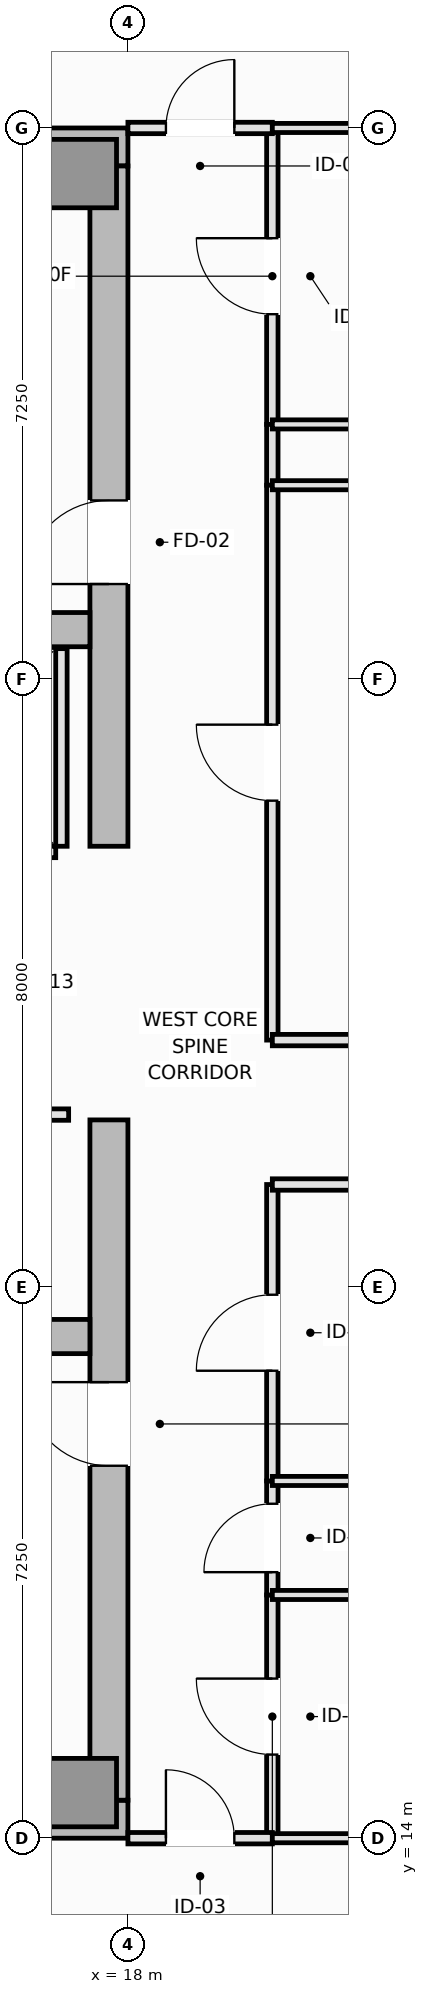
"""IFC4 building model, lengths in metres.
Left out: names, types, materials, properties, quantities, classifications, styles, units other than length and angle.
Written with IfcOpenShell. Run it as: python <this file> out.ifc"""

import sys

from ifc_helpers import new_model, si_unit, direction, frame, frame_2d, origin, origin_2d, place, context, subcontext, project, spatial, rectangle, extrude, element, fill, save


model = new_model("IFC4")
c1 = context("Model", 3, precision=1e-05, world=origin(), true_north=direction((0.0, 1.0)))
c2 = subcontext(c1, "Body", "Model", "MODEL_VIEW")
j1 = project(units=[si_unit("LENGTHUNIT", "METRE"), si_unit("PLANEANGLEUNIT", "RADIAN")], contexts=[c1])
p1 = place(None, origin())
s1 = spatial("IfcSite", under=j1, at=p1, CompositionType="ELEMENT")
p2 = place(p1, origin())
s2 = spatial("IfcBuilding", under=s1, at=p2, CompositionType="ELEMENT")
p3 = place(p2, frame((0.0, 0.0, 249.25)))
s3 = spatial("IfcBuildingStorey", under=s2, at=p3, CompositionType="ELEMENT", Elevation=249.25)
for number, where, z_axis, x_axis in (
    (1, (4.5, 14.25, 0.0), (0.0, 0.0, 1.0), (1.0, 0.0, 0.0)),
    (2, (4.5, 36.25, 0.0), (0.0, 0.0, 1.0), (1.0, 0.0, 0.0)),
):
    element("IfcWall", number, at=place(p3, frame(where, z_axis=z_axis, x_axis=x_axis)), inside=s3, PredefinedType="SHEAR", context=c2, shape_type="SweptSolid", body=[
        extrude(rectangle(XDim=13.5, YDim=0.5, at=frame_2d((6.75, 0.0))), origin(), (0.0, 0.0, 1.0), 3.55),
    ])
p4 = place(p3, frame((17.75, 14.5, 0.0), z_axis=(0.0, 0.0, 1.0), x_axis=(0.0, 1.0, 0.0)))
e3 = element("IfcWall", 3, at=p4, inside=s3, PredefinedType="SHEAR", context=c2, shape_type="SweptSolid", body=[
    extrude(rectangle(XDim=8.95, YDim=0.5, at=frame_2d((4.475, 0.0))), origin(), (0.0, 0.0, 1.0), 3.55),
])
p5 = place(p4, frame((4.4, 0.0, 0.0)))
e4 = element("IfcOpeningElement", 4, at=p5, cuts=e3, PredefinedType="OPENING", context=c2, shape_type="SweptSolid", body=[
    extrude(rectangle(XDim=1.1, YDim=2.15, at=frame_2d((0.55, 1.075))), frame((0.0, 0.26, 0.0), z_axis=(0.0, -1.0, 0.0), x_axis=(1.0, 0.0, 0.0)), (0.0, 0.0, 1.0), 0.52),
])
p6 = place(p3, frame((17.75, 27.05, 0.0), z_axis=(0.0, 0.0, 1.0), x_axis=(0.0, 1.0, 0.0)))
e5 = element("IfcWall", 5, at=p6, inside=s3, PredefinedType="SHEAR", context=c2, shape_type="SweptSolid", body=[
    extrude(rectangle(XDim=8.95, YDim=0.5, at=frame_2d((4.475, 0.0))), origin(), (0.0, 0.0, 1.0), 3.55),
])
p7 = place(p6, frame((3.45, 0.0, 0.0)))
e6 = element("IfcOpeningElement", 6, at=p7, cuts=e5, PredefinedType="OPENING", context=c2, shape_type="SweptSolid", body=[
    extrude(rectangle(XDim=1.1, YDim=2.15, at=frame_2d((0.55, 1.075))), frame((0.0, 0.26, 0.0), z_axis=(0.0, -1.0, 0.0), x_axis=(1.0, 0.0, 0.0)), (0.0, 0.0, 1.0), 0.52),
])
for number, where, z_axis, x_axis in (
    (7, (5.0, 20.6, 0.0), (0.0, 0.0, 1.0), (1.0, 0.0, 0.0)),
    (8, (5.0, 29.9, 0.0), (0.0, 0.0, 1.0), (1.0, 0.0, 0.0)),
):
    element("IfcWall", number, at=place(p3, frame(where, z_axis=z_axis, x_axis=x_axis)), inside=s3, PredefinedType="SHEAR", context=c2, shape_type="SweptSolid", body=[
        extrude(rectangle(XDim=12.5, YDim=0.45, at=frame_2d((6.25, 0.0))), origin(), (0.0, 0.0, 1.0), 3.55),
    ])
for number, where, z_axis, x_axis in (
    (9, (17.4, 14.6, 0.0), (0.0, 0.0, 1.0), (1.0, 0.0, 0.0)),
    (10, (17.4, 35.9, 0.0), (0.0, 0.0, 1.0), (1.0, 0.0, 0.0)),
):
    element("IfcColumn", number, at=place(p3, frame(where, z_axis=z_axis, x_axis=x_axis)), inside=s3, PredefinedType="PILASTER", context=c2, shape_type="SweptSolid", body=[
        extrude(rectangle(XDim=0.9, YDim=0.9, at=origin_2d()), origin(), (0.0, 0.0, 1.0), 3.55),
    ])
p8 = place(p3, frame((14.5, 26.975, 0.0), z_axis=(0.0, 0.0, 1.0), x_axis=(1.0, 0.0, 0.0)))
e11 = element("IfcWall", 11, at=p8, inside=s3, PredefinedType="PARTITIONING", context=c2, shape_type="SweptSolid", body=[
    extrude(rectangle(XDim=2.55, YDim=0.15, at=frame_2d((1.275, 0.0))), origin(), (0.0, 0.0, 1.0), 3.39),
])
p9 = place(p8, frame((0.625, 0.0, 0.0)))
e12 = element("IfcOpeningElement", 12, at=p9, cuts=e11, PredefinedType="OPENING", context=c2, shape_type="SweptSolid", body=[
    extrude(rectangle(XDim=1.3, YDim=2.2, at=frame_2d((0.65, 1.1))), frame((0.0, 0.085, 0.0), z_axis=(0.0, -1.0, 0.0), x_axis=(1.0, 0.0, 0.0)), (0.0, 0.0, 1.0), 0.17),
])
p10 = place(p3, frame((17.125, 27.05, 0.0), z_axis=(0.0, 0.0, 1.0), x_axis=(0.0, 1.0, 0.0)))
e13 = element("IfcWall", 13, at=p10, inside=s3, PredefinedType="PARTITIONING", context=c2, shape_type="SweptSolid", body=[
    extrude(rectangle(XDim=2.6, YDim=0.15, at=frame_2d((1.3, 0.0))), origin(), (0.0, 0.0, 1.0), 3.39),
])
p11 = place(p3, frame((14.33, 23.52, 0.0), z_axis=(0.0, 0.0, 1.0), x_axis=(1.0, 0.0, 0.0)))
e14 = element("IfcWall", 14, at=p11, inside=s3, PredefinedType="PARTITIONING", context=c2, shape_type="SweptSolid", body=[
    extrude(rectangle(XDim=2.89, YDim=0.15, at=frame_2d((1.445, 0.0))), origin(), (0.0, 0.0, 1.0), 3.39),
])
p12 = place(p11, frame((0.28, 0.0, 0.0)))
e15 = element("IfcOpeningElement", 15, at=p12, cuts=e14, PredefinedType="OPENING", context=c2, shape_type="SweptSolid", body=[
    extrude(rectangle(XDim=0.9, YDim=2.1, at=frame_2d((0.45, 1.05))), frame((0.0, 0.085, 0.0), z_axis=(0.0, -1.0, 0.0), x_axis=(1.0, 0.0, 0.0)), (0.0, 0.0, 1.0), 0.17),
])
p13 = place(p11, frame((1.71, 0.0, 0.0)))
e16 = element("IfcOpeningElement", 16, at=p13, cuts=e14, PredefinedType="OPENING", context=c2, shape_type="SweptSolid", body=[
    extrude(rectangle(XDim=0.9, YDim=2.1, at=frame_2d((0.45, 1.05))), frame((0.0, 0.085, 0.0), z_axis=(0.0, -1.0, 0.0), x_axis=(1.0, 0.0, 0.0)), (0.0, 0.0, 1.0), 0.17),
])
p14 = place(p3, frame((19.9, 14.0, 0.0), z_axis=(0.0, 0.0, 1.0), x_axis=(0.0, 1.0, 0.0)))
e17 = element("IfcWall", 17, at=p14, inside=s3, PredefinedType="PARTITIONING", context=c2, shape_type="SweptSolid", body=[
    extrude(rectangle(XDim=3.2, YDim=0.15, at=frame_2d((1.6, 0.0))), origin(), (0.0, 0.0, 1.0), 3.39),
])
p15 = place(p14, frame((1.1, 0.0, 0.0)))
e18 = element("IfcOpeningElement", 18, at=p15, cuts=e17, PredefinedType="OPENING", context=c2, shape_type="SweptSolid", body=[
    extrude(rectangle(XDim=1.0, YDim=2.15, at=frame_2d((0.5, 1.075))), frame((0.0, 0.085, 0.0), z_axis=(0.0, -1.0, 0.0), x_axis=(1.0, 0.0, 0.0)), (0.0, 0.0, 1.0), 0.17),
])
p16 = place(p3, frame((19.9, 17.2, 0.0), z_axis=(0.0, 0.0, 1.0), x_axis=(0.0, 1.0, 0.0)))
e19 = element("IfcWall", 19, at=p16, inside=s3, PredefinedType="PARTITIONING", context=c2, shape_type="SweptSolid", body=[
    extrude(rectangle(XDim=1.5, YDim=0.15, at=frame_2d((0.75, 0.0))), origin(), (0.0, 0.0, 1.0), 3.39),
])
p17 = place(p16, frame((0.3, 0.0, 0.0)))
e20 = element("IfcOpeningElement", 20, at=p17, cuts=e19, PredefinedType="OPENING", context=c2, shape_type="SweptSolid", body=[
    extrude(rectangle(XDim=0.9, YDim=2.1, at=frame_2d((0.45, 1.05))), frame((0.0, 0.085, 0.0), z_axis=(0.0, -1.0, 0.0), x_axis=(1.0, 0.0, 0.0)), (0.0, 0.0, 1.0), 0.17),
])
p18 = place(p3, frame((19.9, 32.6, 0.0), z_axis=(0.0, 0.0, 1.0), x_axis=(0.0, 1.0, 0.0)))
e21 = element("IfcWall", 21, at=p18, inside=s3, PredefinedType="PARTITIONING", context=c2, shape_type="SweptSolid", body=[
    extrude(rectangle(XDim=3.9, YDim=0.15, at=frame_2d((1.95, 0.0))), origin(), (0.0, 0.0, 1.0), 3.39),
])
p19 = place(p18, frame((1.45, 0.0, 0.0)))
e22 = element("IfcOpeningElement", 22, at=p19, cuts=e21, PredefinedType="OPENING", context=c2, shape_type="SweptSolid", body=[
    extrude(rectangle(XDim=1.0, YDim=2.15, at=frame_2d((0.5, 1.075))), frame((0.0, 0.085, 0.0), z_axis=(0.0, -1.0, 0.0), x_axis=(1.0, 0.0, 0.0)), (0.0, 0.0, 1.0), 0.17),
])
p20 = place(p3, frame((19.9, 31.8, 0.0), z_axis=(0.0, 0.0, 1.0), x_axis=(0.0, 1.0, 0.0)))
e23 = element("IfcWall", 23, at=p20, inside=s3, PredefinedType="PARTITIONING", context=c2, shape_type="SweptSolid", body=[
    extrude(rectangle(XDim=0.8, YDim=0.15, at=frame_2d((0.4, 0.0))), origin(), (0.0, 0.0, 1.0), 3.39),
])
p21 = place(p3, frame((19.9, 18.7, 0.0), z_axis=(0.0, 0.0, 1.0), x_axis=(0.0, 1.0, 0.0)))
e24 = element("IfcWall", 24, at=p21, inside=s3, PredefinedType="PARTITIONING", context=c2, shape_type="SweptSolid", body=[
    extrude(rectangle(XDim=3.9, YDim=0.15, at=frame_2d((1.95, 0.0))), origin(), (0.0, 0.0, 1.0), 3.39),
])
p22 = place(p21, frame((1.45, 0.0, 0.0)))
e25 = element("IfcOpeningElement", 25, at=p22, cuts=e24, PredefinedType="OPENING", context=c2, shape_type="SweptSolid", body=[
    extrude(rectangle(XDim=1.0, YDim=2.15, at=frame_2d((0.5, 1.075))), frame((0.0, 0.085, 0.0), z_axis=(0.0, -1.0, 0.0), x_axis=(1.0, 0.0, 0.0)), (0.0, 0.0, 1.0), 0.17),
])
p23 = place(p3, frame((19.9, 24.5, 0.0), z_axis=(0.0, 0.0, 1.0), x_axis=(0.0, 1.0, 0.0)))
e26 = element("IfcWall", 26, at=p23, inside=s3, PredefinedType="PARTITIONING", context=c2, shape_type="SweptSolid", body=[
    extrude(rectangle(XDim=7.3, YDim=0.15, at=frame_2d((3.65, 0.0))), origin(), (0.0, 0.0, 1.0), 3.39),
])
p24 = place(p23, frame((3.15, 0.0, 0.0)))
e27 = element("IfcOpeningElement", 27, at=p24, cuts=e26, PredefinedType="OPENING", context=c2, shape_type="SweptSolid", body=[
    extrude(rectangle(XDim=1.0, YDim=2.15, at=frame_2d((0.5, 1.075))), frame((0.0, 0.085, 0.0), z_axis=(0.0, -1.0, 0.0), x_axis=(1.0, 0.0, 0.0)), (0.0, 0.0, 1.0), 0.17),
])
p25 = place(p3, frame((18.0, 14.0, 0.0), z_axis=(0.0, 0.0, 1.0), x_axis=(1.0, 0.0, 0.0)))
e28 = element("IfcWall", 28, at=p25, inside=s3, PredefinedType="PARTITIONING", context=c2, shape_type="SweptSolid", body=[
    extrude(rectangle(XDim=1.9, YDim=0.15, at=frame_2d((0.95, 0.0))), origin(), (0.0, 0.0, 1.0), 3.39),
])
p26 = place(p25, frame((0.5, 0.0, 0.0)))
e29 = element("IfcOpeningElement", 29, at=p26, cuts=e28, PredefinedType="OPENING", context=c2, shape_type="SweptSolid", body=[
    extrude(rectangle(XDim=0.9, YDim=2.1, at=frame_2d((0.45, 1.05))), frame((0.0, 0.085, 0.0), z_axis=(0.0, -1.0, 0.0), x_axis=(1.0, 0.0, 0.0)), (0.0, 0.0, 1.0), 0.17),
])
p27 = place(p3, frame((18.0, 36.5, 0.0), z_axis=(0.0, 0.0, 1.0), x_axis=(1.0, 0.0, 0.0)))
e30 = element("IfcWall", 30, at=p27, inside=s3, PredefinedType="PARTITIONING", context=c2, shape_type="SweptSolid", body=[
    extrude(rectangle(XDim=1.9, YDim=0.15, at=frame_2d((0.95, 0.0))), origin(), (0.0, 0.0, 1.0), 3.39),
])
p28 = place(p27, frame((0.5, 0.0, 0.0)))
e31 = element("IfcOpeningElement", 31, at=p28, cuts=e30, PredefinedType="OPENING", context=c2, shape_type="SweptSolid", body=[
    extrude(rectangle(XDim=0.9, YDim=2.1, at=frame_2d((0.45, 1.05))), frame((0.0, 0.085, 0.0), z_axis=(0.0, -1.0, 0.0), x_axis=(1.0, 0.0, 0.0)), (0.0, 0.0, 1.0), 0.17),
])
p29 = place(p3, frame((19.9, 22.6, 0.0), z_axis=(0.0, 0.0, 1.0), x_axis=(1.0, 0.0, 0.0)))
e32 = element("IfcWall", 32, at=p29, inside=s3, PredefinedType="PARTITIONING", context=c2, shape_type="SweptSolid", body=[
    extrude(rectangle(XDim=9.35, YDim=0.15, at=frame_2d((4.675, 0.0))), origin(), (0.0, 0.0, 1.0), 3.39),
])
p30 = place(p3, frame((19.9, 24.5, 0.0), z_axis=(0.0, 0.0, 1.0), x_axis=(1.0, 0.0, 0.0)))
e33 = element("IfcWall", 33, at=p30, inside=s3, PredefinedType="PARTITIONING", context=c2, shape_type="SweptSolid", body=[
    extrude(rectangle(XDim=6.72, YDim=0.15, at=frame_2d((3.36, 0.0))), origin(), (0.0, 0.0, 1.0), 3.39),
])
for number, where, z_axis, x_axis in (
    (34, (19.9, 17.2, 0.0), (0.0, 0.0, 1.0), (1.0, 0.0, 0.0)),
    (35, (19.9, 14.0, 0.0), (0.0, 0.0, 1.0), (1.0, 0.0, 0.0)),
):
    element("IfcWall", number, at=place(p3, frame(where, z_axis=z_axis, x_axis=x_axis)), inside=s3, PredefinedType="PARTITIONING", context=c2, shape_type="SweptSolid", body=[
        extrude(rectangle(XDim=12.9, YDim=0.12, at=frame_2d((6.45, 0.0))), origin(), (0.0, 0.0, 1.0), 3.39),
    ])
p31 = place(p3, frame((19.9, 18.7, 0.0), z_axis=(0.0, 0.0, 1.0), x_axis=(1.0, 0.0, 0.0)))
e36 = element("IfcWall", 36, at=p31, inside=s3, PredefinedType="PARTITIONING", context=c2, shape_type="SweptSolid", body=[
    extrude(rectangle(XDim=9.35, YDim=0.12, at=frame_2d((4.675, 0.0))), origin(), (0.0, 0.0, 1.0), 3.39),
])
p32 = place(p3, frame((19.9, 32.6, 0.0), z_axis=(0.0, 0.0, 1.0), x_axis=(1.0, 0.0, 0.0)))
e37 = element("IfcWall", 37, at=p32, inside=s3, PredefinedType="PARTITIONING", context=c2, shape_type="SweptSolid", body=[
    extrude(rectangle(XDim=12.9, YDim=0.12, at=frame_2d((6.45, 0.0))), origin(), (0.0, 0.0, 1.0), 3.39),
])
p33 = place(p32, frame((5.95, 0.0, 0.0)))
e38 = element("IfcOpeningElement", 38, at=p33, cuts=e37, PredefinedType="OPENING", context=c2, shape_type="SweptSolid", body=[
    extrude(rectangle(XDim=1.0, YDim=2.15, at=frame_2d((0.5, 1.075))), frame((0.0, 0.07, 0.0), z_axis=(0.0, -1.0, 0.0), x_axis=(1.0, 0.0, 0.0)), (0.0, 0.0, 1.0), 0.14),
])
p34 = place(p3, frame((19.9, 36.5, 0.0), z_axis=(0.0, 0.0, 1.0), x_axis=(1.0, 0.0, 0.0)))
e39 = element("IfcWall", 39, at=p34, inside=s3, PredefinedType="PARTITIONING", context=c2, shape_type="SweptSolid", body=[
    extrude(rectangle(XDim=12.9, YDim=0.12, at=frame_2d((6.45, 0.0))), origin(), (0.0, 0.0, 1.0), 3.39),
])
p35 = place(p3, frame((19.9, 31.8, 0.0), z_axis=(0.0, 0.0, 1.0), x_axis=(1.0, 0.0, 0.0)))
e40 = element("IfcWall", 40, at=p35, inside=s3, PredefinedType="PARTITIONING", context=c2, shape_type="SweptSolid", body=[
    extrude(rectangle(XDim=6.72, YDim=0.12, at=frame_2d((3.36, 0.0))), origin(), (0.0, 0.0, 1.0), 3.39),
])
p36 = place(p5, origin())
e41 = element("IfcDoor", 41, at=p36, inside=s3, OperationType="SINGLE_SWING_RIGHT", PredefinedType="DOOR", context=c2, shape_type="SweptSolid", body=[
    extrude(rectangle(XDim=1.1, YDim=2.15, at=frame_2d((0.55, 1.075))), frame((0.0, 0.025, 0.0), z_axis=(0.0, -1.0, 0.0), x_axis=(1.0, 0.0, 0.0)), (0.0, 0.0, 1.0), 0.05),
])
fill(e4, e41)
p37 = place(p7, origin())
e42 = element("IfcDoor", 42, at=p37, inside=s3, OperationType="SINGLE_SWING_LEFT", PredefinedType="DOOR", context=c2, shape_type="SweptSolid", body=[
    extrude(rectangle(XDim=1.1, YDim=2.15, at=frame_2d((0.55, 1.075))), frame((0.0, 0.025, 0.0), z_axis=(0.0, -1.0, 0.0), x_axis=(1.0, 0.0, 0.0)), (0.0, 0.0, 1.0), 0.05),
])
fill(e6, e42)
p38 = place(p15, origin())
e43 = element("IfcDoor", 43, at=p38, inside=s3, OperationType="SINGLE_SWING_RIGHT", PredefinedType="DOOR", context=c2, shape_type="SweptSolid", body=[
    extrude(rectangle(XDim=1.0, YDim=2.15, at=frame_2d((0.5, 1.075))), frame((0.0, 0.025, 0.0), z_axis=(0.0, -1.0, 0.0), x_axis=(1.0, 0.0, 0.0)), (0.0, 0.0, 1.0), 0.05),
])
fill(e18, e43)
p39 = place(p17, origin())
e44 = element("IfcDoor", 44, at=p39, inside=s3, OperationType="SINGLE_SWING_LEFT", PredefinedType="DOOR", context=c2, shape_type="SweptSolid", body=[
    extrude(rectangle(XDim=0.9, YDim=2.1, at=frame_2d((0.45, 1.05))), frame((0.0, 0.025, 0.0), z_axis=(0.0, -1.0, 0.0), x_axis=(1.0, 0.0, 0.0)), (0.0, 0.0, 1.0), 0.05),
])
fill(e20, e44)
p40 = place(p19, origin())
e45 = element("IfcDoor", 45, at=p40, inside=s3, OperationType="SINGLE_SWING_RIGHT", PredefinedType="DOOR", context=c2, shape_type="SweptSolid", body=[
    extrude(rectangle(XDim=1.0, YDim=2.15, at=frame_2d((0.5, 1.075))), frame((0.0, 0.025, 0.0), z_axis=(0.0, -1.0, 0.0), x_axis=(1.0, 0.0, 0.0)), (0.0, 0.0, 1.0), 0.05),
])
fill(e22, e45)
p41 = place(p22, origin())
e46 = element("IfcDoor", 46, at=p41, inside=s3, OperationType="SINGLE_SWING_LEFT", PredefinedType="DOOR", context=c2, shape_type="SweptSolid", body=[
    extrude(rectangle(XDim=1.0, YDim=2.15, at=frame_2d((0.5, 1.075))), frame((0.0, 0.025, 0.0), z_axis=(0.0, -1.0, 0.0), x_axis=(1.0, 0.0, 0.0)), (0.0, 0.0, 1.0), 0.05),
])
fill(e25, e46)
p42 = place(p24, origin())
e47 = element("IfcDoor", 47, at=p42, inside=s3, OperationType="SINGLE_SWING_RIGHT", PredefinedType="DOOR", context=c2, shape_type="SweptSolid", body=[
    extrude(rectangle(XDim=1.0, YDim=2.15, at=frame_2d((0.5, 1.075))), frame((0.0, 0.025, 0.0), z_axis=(0.0, -1.0, 0.0), x_axis=(1.0, 0.0, 0.0)), (0.0, 0.0, 1.0), 0.05),
])
fill(e27, e47)
p43 = place(p26, origin())
e48 = element("IfcDoor", 48, at=p43, inside=s3, OperationType="SINGLE_SWING_LEFT", PredefinedType="DOOR", context=c2, shape_type="SweptSolid", body=[
    extrude(rectangle(XDim=0.9, YDim=2.1, at=frame_2d((0.45, 1.05))), frame((0.0, 0.025, 0.0), z_axis=(0.0, -1.0, 0.0), x_axis=(1.0, 0.0, 0.0)), (0.0, 0.0, 1.0), 0.05),
])
fill(e29, e48)
p44 = place(p28, origin())
e49 = element("IfcDoor", 49, at=p44, inside=s3, OperationType="SINGLE_SWING_RIGHT", PredefinedType="DOOR", context=c2, shape_type="SweptSolid", body=[
    extrude(rectangle(XDim=0.9, YDim=2.1, at=frame_2d((0.45, 1.05))), frame((0.0, 0.025, 0.0), z_axis=(0.0, -1.0, 0.0), x_axis=(1.0, 0.0, 0.0)), (0.0, 0.0, 1.0), 0.05),
])
fill(e31, e49)
save(model, sys.argv[1])
